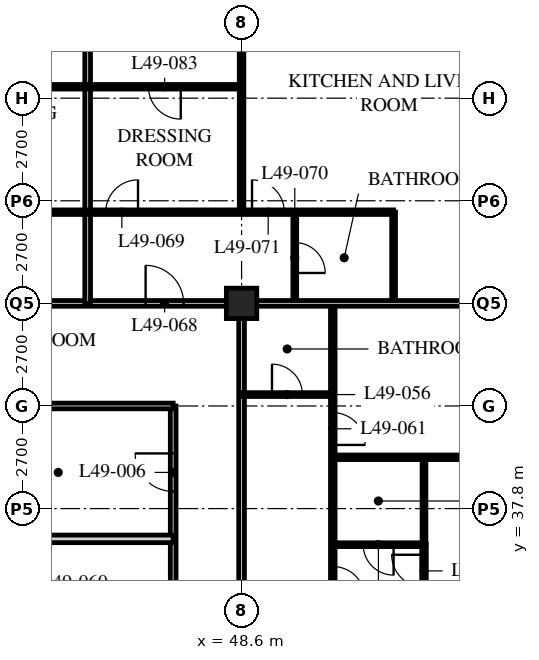
"""IFC4 building model, lengths in metres.
Left out: names, types, materials, properties, quantities, classifications, styles, units other than length and angle.
Written with IfcOpenShell. Run it as: python <this file> out.ifc"""

import sys

from ifc_helpers import new_model, si_unit, direction, frame, frame_2d, origin, origin_2d, place, context, subcontext, project, spatial, rectangle, hollow_rectangle, extrude, element, fill, save


model = new_model("IFC4")
c1 = context("Model", 3, precision=1e-05, world=origin(), true_north=direction((0.0, 1.0)))
c2 = subcontext(c1, "Body", "Model", "MODEL_VIEW")
j1 = project(units=[si_unit("LENGTHUNIT", "METRE"), si_unit("PLANEANGLEUNIT", "RADIAN")], contexts=[c1])
p1 = place(None, origin())
s1 = spatial("IfcSite", under=j1, at=p1, CompositionType="ELEMENT")
p2 = place(p1, origin())
s2 = spatial("IfcBuilding", under=s1, at=p2, CompositionType="ELEMENT")
p3 = place(p2, frame((0.0, 0.0, 192.0)))
s3 = spatial("IfcBuildingStorey", under=s2, at=p3, CompositionType="ELEMENT", Elevation=192.0)
p4 = place(p3, frame((48.6, 43.2, 0.0), z_axis=(0.0, 0.0, 1.0), x_axis=(1.0, 0.0, 0.0)))
e1 = element("IfcColumn", 1, at=p4, inside=s3, PredefinedType="COLUMN", context=c2, shape_type="SweptSolid", body=[
    extrude(hollow_rectangle(XDim=0.8, YDim=0.8, WallThickness=0.08, at=origin_2d()), origin(), (0.0, 0.0, 1.0), 3.6),
])
p5 = place(p3, frame((8.1, 43.2, 0.0), z_axis=(0.0, 0.0, 1.0), x_axis=(1.0, 0.0, 0.0)))
e2 = element("IfcWall", 2, at=p5, inside=s3, PredefinedType="PARTITIONING", context=c2, shape_type="SweptSolid", body=[
    extrude(rectangle(XDim=40.5, YDim=0.15, at=frame_2d((20.25, 0.0))), origin(), (0.0, 0.0, 1.0), 2.778),
])
p6 = place(p5, frame((4.45, 0.0, 0.0)))
e3 = element("IfcOpeningElement", 3, at=p6, cuts=e2, PredefinedType="OPENING", context=c2, shape_type="SweptSolid", body=[
    extrude(rectangle(XDim=1.0, YDim=2.1, at=frame_2d((0.5, 1.05))), frame((0.0, 0.085, 0.0), z_axis=(0.0, -1.0, 0.0), x_axis=(1.0, 0.0, 0.0)), (0.0, 0.0, 1.0), 0.17),
])
p7 = place(p5, frame((20.65, 0.0, 0.0)))
e4 = element("IfcOpeningElement", 4, at=p7, cuts=e2, PredefinedType="OPENING", context=c2, shape_type="SweptSolid", body=[
    extrude(rectangle(XDim=1.0, YDim=2.1, at=frame_2d((0.5, 1.05))), frame((0.0, 0.085, 0.0), z_axis=(0.0, -1.0, 0.0), x_axis=(1.0, 0.0, 0.0)), (0.0, 0.0, 1.0), 0.17),
])
p8 = place(p5, frame((28.75, 0.0, 0.0)))
e5 = element("IfcOpeningElement", 5, at=p8, cuts=e2, PredefinedType="OPENING", context=c2, shape_type="SweptSolid", body=[
    extrude(rectangle(XDim=1.0, YDim=2.1, at=frame_2d((0.5, 1.05))), frame((0.0, 0.085, 0.0), z_axis=(0.0, -1.0, 0.0), x_axis=(1.0, 0.0, 0.0)), (0.0, 0.0, 1.0), 0.17),
])
p9 = place(p5, frame((37.975, 0.0, 0.0)))
e6 = element("IfcOpeningElement", 6, at=p9, cuts=e2, PredefinedType="OPENING", context=c2, shape_type="SweptSolid", body=[
    extrude(rectangle(XDim=1.0, YDim=2.1, at=frame_2d((0.5, 1.05))), frame((0.0, 0.085, 0.0), z_axis=(0.0, -1.0, 0.0), x_axis=(1.0, 0.0, 0.0)), (0.0, 0.0, 1.0), 0.17),
])
p10 = place(p5, frame((1.525, 0.0, 0.0)))
e7 = element("IfcOpeningElement", 7, at=p10, cuts=e2, PredefinedType="OPENING", context=c2, shape_type="SweptSolid", body=[
    extrude(rectangle(XDim=1.0, YDim=2.1, at=frame_2d((0.5, 1.05))), frame((0.0, 0.085, 0.0), z_axis=(0.0, -1.0, 0.0), x_axis=(1.0, 0.0, 0.0)), (0.0, 0.0, 1.0), 0.17),
])
p11 = place(p3, frame((48.6, 18.9, 0.0), z_axis=(0.0, 0.0, 1.0), x_axis=(0.0, 1.0, 0.0)))
e8 = element("IfcWall", 8, at=p11, inside=s3, PredefinedType="PARTITIONING", context=c2, shape_type="SweptSolid", body=[
    extrude(rectangle(XDim=24.3, YDim=0.15, at=frame_2d((12.15, 0.0))), origin(), (0.0, 0.0, 1.0), 2.778),
])
p12 = place(p11, frame((2.35, 0.0, 0.0)))
e9 = element("IfcOpeningElement", 9, at=p12, cuts=e8, PredefinedType="OPENING", context=c2, shape_type="SweptSolid", body=[
    extrude(rectangle(XDim=1.0, YDim=2.1, at=frame_2d((0.5, 1.05))), frame((0.0, 0.085, 0.0), z_axis=(0.0, -1.0, 0.0), x_axis=(1.0, 0.0, 0.0)), (0.0, 0.0, 1.0), 0.17),
])
p13 = place(p11, frame((4.75, 0.0, 0.0)))
e10 = element("IfcOpeningElement", 10, at=p13, cuts=e8, PredefinedType="OPENING", context=c2, shape_type="SweptSolid", body=[
    extrude(rectangle(XDim=1.0, YDim=2.1, at=frame_2d((0.5, 1.05))), frame((0.0, 0.085, 0.0), z_axis=(0.0, -1.0, 0.0), x_axis=(1.0, 0.0, 0.0)), (0.0, 0.0, 1.0), 0.17),
])
p14 = place(p11, frame((9.0, 0.0, 0.0)))
e11 = element("IfcOpeningElement", 11, at=p14, cuts=e8, PredefinedType="OPENING", context=c2, shape_type="SweptSolid", body=[
    extrude(rectangle(XDim=1.0, YDim=2.1, at=frame_2d((0.5, 1.05))), frame((0.0, 0.085, 0.0), z_axis=(0.0, -1.0, 0.0), x_axis=(1.0, 0.0, 0.0)), (0.0, 0.0, 1.0), 0.17),
])
p15 = place(p3, frame((46.8, 20.7, 0.0), z_axis=(0.0, 0.0, 1.0), x_axis=(0.0, 1.0, 0.0)))
e12 = element("IfcWall", 12, at=p15, inside=s3, PredefinedType="PARTITIONING", context=c2, shape_type="SweptSolid", body=[
    extrude(rectangle(XDim=19.8, YDim=0.15, at=frame_2d((9.9, 0.0))), origin(), (0.0, 0.0, 1.0), 3.39),
])
p16 = place(p15, frame((4.052, 0.0, 0.0)))
e13 = element("IfcOpeningElement", 13, at=p16, cuts=e12, PredefinedType="OPENING", context=c2, shape_type="SweptSolid", body=[
    extrude(rectangle(XDim=1.0, YDim=2.1, at=frame_2d((0.5, 1.05))), frame((0.0, 0.085, 0.0), z_axis=(0.0, -1.0, 0.0), x_axis=(1.0, 0.0, 0.0)), (0.0, 0.0, 1.0), 0.17),
])
p17 = place(p15, frame((8.102, 0.0, 0.0)))
e14 = element("IfcOpeningElement", 14, at=p17, cuts=e12, PredefinedType="OPENING", context=c2, shape_type="SweptSolid", body=[
    extrude(rectangle(XDim=1.0, YDim=2.1, at=frame_2d((0.5, 1.05))), frame((0.0, 0.085, 0.0), z_axis=(0.0, -1.0, 0.0), x_axis=(1.0, 0.0, 0.0)), (0.0, 0.0, 1.0), 0.17),
])
p18 = place(p15, frame((13.502, 0.0, 0.0)))
e15 = element("IfcOpeningElement", 15, at=p18, cuts=e12, PredefinedType="OPENING", context=c2, shape_type="SweptSolid", body=[
    extrude(rectangle(XDim=1.0, YDim=2.1, at=frame_2d((0.5, 1.05))), frame((0.0, 0.085, 0.0), z_axis=(0.0, -1.0, 0.0), x_axis=(1.0, 0.0, 0.0)), (0.0, 0.0, 1.0), 0.17),
])
p19 = place(p15, frame((17.552, 0.0, 0.0)))
e16 = element("IfcOpeningElement", 16, at=p19, cuts=e12, PredefinedType="OPENING", context=c2, shape_type="SweptSolid", body=[
    extrude(rectangle(XDim=1.0, YDim=2.1, at=frame_2d((0.5, 1.05))), frame((0.0, 0.085, 0.0), z_axis=(0.0, -1.0, 0.0), x_axis=(1.0, 0.0, 0.0)), (0.0, 0.0, 1.0), 0.17),
])
p20 = place(p3, frame((46.8, 40.5, 0.0), z_axis=(0.0, 0.0, 1.0), x_axis=(-1.0, 0.0, 0.0)))
e17 = element("IfcWall", 17, at=p20, inside=s3, PredefinedType="PARTITIONING", context=c2, shape_type="SweptSolid", body=[
    extrude(rectangle(XDim=6.1, YDim=0.15, at=frame_2d((3.05, 0.0))), origin(), (0.0, 0.0, 1.0), 3.39),
])
p21 = place(p3, frame((46.8, 37.003, 0.0), z_axis=(0.0, 0.0, 1.0), x_axis=(-1.0, 0.0, 0.0)))
e18 = element("IfcWall", 18, at=p21, inside=s3, PredefinedType="SOLIDWALL", context=c2, shape_type="SweptSolid", body=[
    extrude(rectangle(XDim=6.3, YDim=0.2, at=frame_2d((3.15, 0.0))), origin(), (0.0, 0.0, 1.0), 3.39),
])
p22 = place(p3, frame((51.0, 27.0, 0.0), z_axis=(0.0, 0.0, 1.0), x_axis=(0.0, 1.0, 0.0)))
e19 = element("IfcWall", 19, at=p22, inside=s3, PredefinedType="PARTITIONING", context=c2, shape_type="SweptSolid", body=[
    extrude(rectangle(XDim=16.2, YDim=0.12, at=frame_2d((8.1, 0.0))), origin(), (0.0, 0.0, 1.0), 3.39),
])
p23 = place(p22, frame((0.975, 0.0, 0.0)))
e20 = element("IfcOpeningElement", 20, at=p23, cuts=e19, PredefinedType="OPENING", context=c2, shape_type="SweptSolid", body=[
    extrude(rectangle(XDim=0.85, YDim=2.1, at=frame_2d((0.425, 1.05))), frame((0.0, 0.07, 0.0), z_axis=(0.0, -1.0, 0.0), x_axis=(1.0, 0.0, 0.0)), (0.0, 0.0, 1.0), 0.14),
])
p24 = place(p22, frame((8.425, 0.0, 0.0)))
e21 = element("IfcOpeningElement", 21, at=p24, cuts=e19, PredefinedType="OPENING", context=c2, shape_type="SweptSolid", body=[
    extrude(rectangle(XDim=0.85, YDim=2.1, at=frame_2d((0.425, 1.05))), frame((0.0, 0.07, 0.0), z_axis=(0.0, -1.0, 0.0), x_axis=(1.0, 0.0, 0.0)), (0.0, 0.0, 1.0), 0.14),
])
p25 = place(p22, frame((12.475, 0.0, 0.0)))
e22 = element("IfcOpeningElement", 22, at=p25, cuts=e19, PredefinedType="OPENING", context=c2, shape_type="SweptSolid", body=[
    extrude(rectangle(XDim=0.85, YDim=2.1, at=frame_2d((0.425, 1.05))), frame((0.0, 0.07, 0.0), z_axis=(0.0, -1.0, 0.0), x_axis=(1.0, 0.0, 0.0)), (0.0, 0.0, 1.0), 0.14),
])
p26 = place(p3, frame((48.6, 40.8, 0.0), z_axis=(0.0, 0.0, 1.0), x_axis=(1.0, 0.0, 0.0)))
e23 = element("IfcWall", 23, at=p26, inside=s3, PredefinedType="PARTITIONING", context=c2, shape_type="SweptSolid", body=[
    extrude(rectangle(XDim=2.4, YDim=0.1, at=frame_2d((1.2, 0.0))), origin(), (0.0, 0.0, 1.0), 3.39),
])
p27 = place(p26, frame((0.8, 0.0, 0.0)))
e24 = element("IfcOpeningElement", 24, at=p27, cuts=e23, PredefinedType="OPENING", context=c2, shape_type="SweptSolid", body=[
    extrude(rectangle(XDim=0.8, YDim=2.1, at=frame_2d((0.4, 1.05))), frame((0.0, 0.06, 0.0), z_axis=(0.0, -1.0, 0.0), x_axis=(1.0, 0.0, 0.0)), (0.0, 0.0, 1.0), 0.12),
])
p28 = place(p3, frame((51.0, 36.85, 0.0), z_axis=(0.0, 0.0, 1.0), x_axis=(1.0, 0.0, 0.0)))
e25 = element("IfcWall", 25, at=p28, inside=s3, PredefinedType="PARTITIONING", context=c2, shape_type="SweptSolid", body=[
    extrude(rectangle(XDim=2.4, YDim=0.1, at=frame_2d((1.2, 0.0))), origin(), (0.0, 0.0, 1.0), 3.39),
])
p29 = place(p28, frame((0.8, 0.0, 0.0)))
e26 = element("IfcOpeningElement", 26, at=p29, cuts=e25, PredefinedType="OPENING", context=c2, shape_type="SweptSolid", body=[
    extrude(rectangle(XDim=0.8, YDim=2.1, at=frame_2d((0.4, 1.05))), frame((0.0, 0.06, 0.0), z_axis=(0.0, -1.0, 0.0), x_axis=(1.0, 0.0, 0.0)), (0.0, 0.0, 1.0), 0.12),
])
p30 = place(p3, frame((53.4, 36.85, 0.0), z_axis=(0.0, 0.0, 1.0), x_axis=(0.0, 1.0, 0.0)))
e27 = element("IfcWall", 27, at=p30, inside=s3, PredefinedType="PARTITIONING", context=c2, shape_type="SweptSolid", body=[
    extrude(rectangle(XDim=2.3, YDim=0.1, at=frame_2d((1.15, 0.0))), origin(), (0.0, 0.0, 1.0), 3.39),
])
p31 = place(p3, frame((51.0, 39.15, 0.0), z_axis=(0.0, 0.0, 1.0), x_axis=(1.0, 0.0, 0.0)))
e28 = element("IfcWall", 28, at=p31, inside=s3, PredefinedType="PARTITIONING", context=c2, shape_type="SweptSolid", body=[
    extrude(rectangle(XDim=5.4, YDim=0.12, at=frame_2d((2.7, 0.0))), origin(), (0.0, 0.0, 1.0), 3.39),
])
p32 = place(p3, frame((50.0, 43.2, 0.0), z_axis=(0.0, 0.0, 1.0), x_axis=(0.0, 1.0, 0.0)))
e29 = element("IfcWall", 29, at=p32, inside=s3, PredefinedType="PARTITIONING", context=c2, shape_type="SweptSolid", body=[
    extrude(rectangle(XDim=2.4, YDim=0.1, at=frame_2d((1.2, 0.0))), origin(), (0.0, 0.0, 1.0), 3.39),
])
p33 = place(p32, frame((0.8, 0.0, 0.0)))
e30 = element("IfcOpeningElement", 30, at=p33, cuts=e29, PredefinedType="OPENING", context=c2, shape_type="SweptSolid", body=[
    extrude(rectangle(XDim=0.8, YDim=2.1, at=frame_2d((0.4, 1.05))), frame((0.0, 0.06, 0.0), z_axis=(0.0, -1.0, 0.0), x_axis=(1.0, 0.0, 0.0)), (0.0, 0.0, 1.0), 0.12),
])
p34 = place(p3, frame((52.6, 43.2, 0.0), z_axis=(0.0, 0.0, 1.0), x_axis=(0.0, 1.0, 0.0)))
e31 = element("IfcWall", 31, at=p34, inside=s3, PredefinedType="PARTITIONING", context=c2, shape_type="SweptSolid", body=[
    extrude(rectangle(XDim=2.4, YDim=0.1, at=frame_2d((1.2, 0.0))), origin(), (0.0, 0.0, 1.0), 3.39),
])
p35 = place(p3, frame((48.6, 45.6, 0.0), z_axis=(0.0, 0.0, 1.0), x_axis=(0.0, 1.0, 0.0)))
e32 = element("IfcWall", 32, at=p35, inside=s3, PredefinedType="PARTITIONING", context=c2, shape_type="SweptSolid", body=[
    extrude(rectangle(XDim=9.45, YDim=0.12, at=frame_2d((4.725, 0.0))), origin(), (0.0, 0.0, 1.0), 2.778),
])
p36 = place(p3, frame((48.6, 43.2, 0.0), z_axis=(0.0, 0.0, 1.0), x_axis=(1.0, 0.0, 0.0)))
e33 = element("IfcWall", 33, at=p36, inside=s3, PredefinedType="PARTITIONING", context=c2, shape_type="SweptSolid", body=[
    extrude(rectangle(XDim=7.8, YDim=0.15, at=frame_2d((3.9, 0.0))), origin(), (0.0, 0.0, 1.0), 2.778),
])
p37 = place(p3, frame((44.55, 43.2, 0.0), z_axis=(0.0, 0.0, 1.0), x_axis=(0.0, 1.0, 0.0)))
e34 = element("IfcWall", 34, at=p37, inside=s3, PredefinedType="PARTITIONING", context=c2, shape_type="SweptSolid", body=[
    extrude(rectangle(XDim=15.9, YDim=0.15, at=frame_2d((7.95, 0.0))), origin(), (0.0, 0.0, 1.0), 3.39),
])
p38 = place(p3, frame((4.1, 45.6, 0.0), z_axis=(0.0, 0.0, 1.0), x_axis=(1.0, 0.0, 0.0)))
e35 = element("IfcWall", 35, at=p38, inside=s3, PredefinedType="PARTITIONING", context=c2, shape_type="SweptSolid", body=[
    extrude(rectangle(XDim=48.5, YDim=0.12, at=frame_2d((24.25, 0.0))), origin(), (0.0, 0.0, 1.0), 3.39),
])
p39 = place(p38, frame((9.025, 0.0, 0.0)))
e36 = element("IfcOpeningElement", 36, at=p39, cuts=e35, PredefinedType="OPENING", context=c2, shape_type="SweptSolid", body=[
    extrude(rectangle(XDim=0.85, YDim=2.1, at=frame_2d((0.425, 1.05))), frame((0.0, 0.07, 0.0), z_axis=(0.0, -1.0, 0.0), x_axis=(1.0, 0.0, 0.0)), (0.0, 0.0, 1.0), 0.14),
])
p40 = place(p38, frame((16.475, 0.0, 0.0)))
e37 = element("IfcOpeningElement", 37, at=p40, cuts=e35, PredefinedType="OPENING", context=c2, shape_type="SweptSolid", body=[
    extrude(rectangle(XDim=0.85, YDim=2.1, at=frame_2d((0.425, 1.05))), frame((0.0, 0.07, 0.0), z_axis=(0.0, -1.0, 0.0), x_axis=(1.0, 0.0, 0.0)), (0.0, 0.0, 1.0), 0.14),
])
p41 = place(p38, frame((20.525, 0.0, 0.0)))
e38 = element("IfcOpeningElement", 38, at=p41, cuts=e35, PredefinedType="OPENING", context=c2, shape_type="SweptSolid", body=[
    extrude(rectangle(XDim=0.85, YDim=2.1, at=frame_2d((0.425, 1.05))), frame((0.0, 0.07, 0.0), z_axis=(0.0, -1.0, 0.0), x_axis=(1.0, 0.0, 0.0)), (0.0, 0.0, 1.0), 0.14),
])
p42 = place(p38, frame((25.225, 0.0, 0.0)))
e39 = element("IfcOpeningElement", 39, at=p42, cuts=e35, PredefinedType="OPENING", context=c2, shape_type="SweptSolid", body=[
    extrude(rectangle(XDim=0.85, YDim=2.1, at=frame_2d((0.425, 1.05))), frame((0.0, 0.07, 0.0), z_axis=(0.0, -1.0, 0.0), x_axis=(1.0, 0.0, 0.0)), (0.0, 0.0, 1.0), 0.14),
])
p43 = place(p38, frame((28.625, 0.0, 0.0)))
e40 = element("IfcOpeningElement", 40, at=p43, cuts=e35, PredefinedType="OPENING", context=c2, shape_type="SweptSolid", body=[
    extrude(rectangle(XDim=0.85, YDim=2.1, at=frame_2d((0.425, 1.05))), frame((0.0, 0.07, 0.0), z_axis=(0.0, -1.0, 0.0), x_axis=(1.0, 0.0, 0.0)), (0.0, 0.0, 1.0), 0.14),
])
p44 = place(p38, frame((33.325, 0.0, 0.0)))
e41 = element("IfcOpeningElement", 41, at=p44, cuts=e35, PredefinedType="OPENING", context=c2, shape_type="SweptSolid", body=[
    extrude(rectangle(XDim=0.85, YDim=2.1, at=frame_2d((0.425, 1.05))), frame((0.0, 0.07, 0.0), z_axis=(0.0, -1.0, 0.0), x_axis=(1.0, 0.0, 0.0)), (0.0, 0.0, 1.0), 0.14),
])
p45 = place(p38, frame((36.725, 0.0, 0.0)))
e42 = element("IfcOpeningElement", 42, at=p45, cuts=e35, PredefinedType="OPENING", context=c2, shape_type="SweptSolid", body=[
    extrude(rectangle(XDim=0.85, YDim=2.1, at=frame_2d((0.425, 1.05))), frame((0.0, 0.07, 0.0), z_axis=(0.0, -1.0, 0.0), x_axis=(1.0, 0.0, 0.0)), (0.0, 0.0, 1.0), 0.14),
])
p46 = place(p38, frame((40.925, 0.0, 0.0)))
e43 = element("IfcOpeningElement", 43, at=p46, cuts=e35, PredefinedType="OPENING", context=c2, shape_type="SweptSolid", body=[
    extrude(rectangle(XDim=0.85, YDim=2.1, at=frame_2d((0.425, 1.05))), frame((0.0, 0.07, 0.0), z_axis=(0.0, -1.0, 0.0), x_axis=(1.0, 0.0, 0.0)), (0.0, 0.0, 1.0), 0.14),
])
p47 = place(p38, frame((44.775, 0.0, 0.0)))
e44 = element("IfcOpeningElement", 44, at=p47, cuts=e35, PredefinedType="OPENING", context=c2, shape_type="SweptSolid", body=[
    extrude(rectangle(XDim=0.85, YDim=2.1, at=frame_2d((0.425, 1.05))), frame((0.0, 0.07, 0.0), z_axis=(0.0, -1.0, 0.0), x_axis=(1.0, 0.0, 0.0)), (0.0, 0.0, 1.0), 0.14),
])
p48 = place(p38, frame((6.725, 0.0, 0.0)))
e45 = element("IfcOpeningElement", 45, at=p48, cuts=e35, PredefinedType="OPENING", context=c2, shape_type="SweptSolid", body=[
    extrude(rectangle(XDim=0.85, YDim=2.1, at=frame_2d((0.425, 1.05))), frame((0.0, 0.07, 0.0), z_axis=(0.0, -1.0, 0.0), x_axis=(1.0, 0.0, 0.0)), (0.0, 0.0, 1.0), 0.14),
])
p49 = place(p38, frame((2.875, 0.0, 0.0)))
e46 = element("IfcOpeningElement", 46, at=p49, cuts=e35, PredefinedType="OPENING", context=c2, shape_type="SweptSolid", body=[
    extrude(rectangle(XDim=0.85, YDim=2.1, at=frame_2d((0.425, 1.05))), frame((0.0, 0.07, 0.0), z_axis=(0.0, -1.0, 0.0), x_axis=(1.0, 0.0, 0.0)), (0.0, 0.0, 1.0), 0.14),
])
p50 = place(p3, frame((53.4, 36.86, 0.0), z_axis=(0.0, 0.0, 1.0), x_axis=(0.0, -1.0, 0.0)))
e47 = element("IfcWall", 47, at=p50, inside=s3, PredefinedType="PARTITIONING", context=c2, shape_type="SweptSolid", body=[
    extrude(rectangle(XDim=1.76, YDim=0.12, at=frame_2d((0.88, 0.0))), origin(), (0.0, 0.0, 1.0), 3.39),
])
p51 = place(p50, frame((0.275, 0.0, 0.0)))
e48 = element("IfcOpeningElement", 48, at=p51, cuts=e47, PredefinedType="OPENING", context=c2, shape_type="SweptSolid", body=[
    extrude(rectangle(XDim=0.85, YDim=2.1, at=frame_2d((0.425, 1.05))), frame((0.0, 0.07, 0.0), z_axis=(0.0, -1.0, 0.0), x_axis=(1.0, 0.0, 0.0)), (0.0, 0.0, 1.0), 0.14),
])
p52 = place(p3, frame((40.5, 48.9, 0.0), z_axis=(0.0, 0.0, 1.0), x_axis=(1.0, 0.0, 0.0)))
e49 = element("IfcWall", 49, at=p52, inside=s3, PredefinedType="PARTITIONING", context=c2, shape_type="SweptSolid", body=[
    extrude(rectangle(XDim=8.1, YDim=0.12, at=frame_2d((4.05, 0.0))), origin(), (0.0, 0.0, 1.0), 3.39),
])
p53 = place(p52, frame((1.6, 0.0, 0.0)))
e50 = element("IfcOpeningElement", 50, at=p53, cuts=e49, PredefinedType="OPENING", context=c2, shape_type="SweptSolid", body=[
    extrude(rectangle(XDim=0.85, YDim=2.1, at=frame_2d((0.425, 1.05))), frame((0.0, 0.07, 0.0), z_axis=(0.0, -1.0, 0.0), x_axis=(1.0, 0.0, 0.0)), (0.0, 0.0, 1.0), 0.14),
])
p54 = place(p52, frame((5.65, 0.0, 0.0)))
e51 = element("IfcOpeningElement", 51, at=p54, cuts=e49, PredefinedType="OPENING", context=c2, shape_type="SweptSolid", body=[
    extrude(rectangle(XDim=0.85, YDim=2.1, at=frame_2d((0.425, 1.05))), frame((0.0, 0.07, 0.0), z_axis=(0.0, -1.0, 0.0), x_axis=(1.0, 0.0, 0.0)), (0.0, 0.0, 1.0), 0.14),
])
p55 = place(p19, origin())
e52 = element("IfcDoor", 52, at=p55, inside=s3, OperationType="SINGLE_SWING_RIGHT", PredefinedType="DOOR", context=c2, shape_type="SweptSolid", body=[
    extrude(rectangle(XDim=1.0, YDim=2.1, at=frame_2d((0.5, 1.05))), frame((0.0, 0.025, 0.0), z_axis=(0.0, -1.0, 0.0), x_axis=(1.0, 0.0, 0.0)), (0.0, 0.0, 1.0), 0.05),
])
fill(e16, e52)
p56 = place(p27, origin())
e53 = element("IfcDoor", 53, at=p56, inside=s3, OperationType="SINGLE_SWING_LEFT", PredefinedType="DOOR", context=c2, shape_type="SweptSolid", body=[
    extrude(rectangle(XDim=0.8, YDim=2.1, at=frame_2d((0.4, 1.05))), frame((0.0, 0.025, 0.0), z_axis=(0.0, -1.0, 0.0), x_axis=(1.0, 0.0, 0.0)), (0.0, 0.0, 1.0), 0.05),
])
fill(e24, e53)
p57 = place(p29, origin())
e54 = element("IfcDoor", 54, at=p57, inside=s3, OperationType="SINGLE_SWING_LEFT", PredefinedType="DOOR", context=c2, shape_type="SweptSolid", body=[
    extrude(rectangle(XDim=0.8, YDim=2.1, at=frame_2d((0.4, 1.05))), frame((0.0, 0.025, 0.0), z_axis=(0.0, -1.0, 0.0), x_axis=(1.0, 0.0, 0.0)), (0.0, 0.0, 1.0), 0.05),
])
fill(e26, e54)
p58 = place(p24, origin())
e55 = element("IfcDoor", 55, at=p58, inside=s3, OperationType="SINGLE_SWING_RIGHT", PredefinedType="DOOR", context=c2, shape_type="SweptSolid", body=[
    extrude(rectangle(XDim=0.85, YDim=2.1, at=frame_2d((0.425, 1.05))), frame((0.0, 0.025, 0.0), z_axis=(0.0, -1.0, 0.0), x_axis=(1.0, 0.0, 0.0)), (0.0, 0.0, 1.0), 0.05),
])
fill(e21, e55)
p59 = place(p25, origin())
e56 = element("IfcDoor", 56, at=p59, inside=s3, OperationType="SINGLE_SWING_RIGHT", PredefinedType="DOOR", context=c2, shape_type="SweptSolid", body=[
    extrude(rectangle(XDim=0.85, YDim=2.1, at=frame_2d((0.425, 1.05))), frame((0.0, 0.025, 0.0), z_axis=(0.0, -1.0, 0.0), x_axis=(1.0, 0.0, 0.0)), (0.0, 0.0, 1.0), 0.05),
])
fill(e22, e56)
p60 = place(p9, origin())
e57 = element("IfcDoor", 57, at=p60, inside=s3, OperationType="SINGLE_SWING_LEFT", PredefinedType="DOOR", context=c2, shape_type="SweptSolid", body=[
    extrude(rectangle(XDim=1.0, YDim=2.1, at=frame_2d((0.5, 1.05))), frame((0.0, 0.025, 0.0), z_axis=(0.0, -1.0, 0.0), x_axis=(1.0, 0.0, 0.0)), (0.0, 0.0, 1.0), 0.05),
])
fill(e6, e57)
p61 = place(p46, origin())
e58 = element("IfcDoor", 58, at=p61, inside=s3, OperationType="SINGLE_SWING_RIGHT", PredefinedType="DOOR", context=c2, shape_type="SweptSolid", body=[
    extrude(rectangle(XDim=0.85, YDim=2.1, at=frame_2d((0.425, 1.05))), frame((0.0, 0.025, 0.0), z_axis=(0.0, -1.0, 0.0), x_axis=(1.0, 0.0, 0.0)), (0.0, 0.0, 1.0), 0.05),
])
fill(e43, e58)
p62 = place(p33, origin())
e59 = element("IfcDoor", 59, at=p62, inside=s3, OperationType="SINGLE_SWING_RIGHT", PredefinedType="DOOR", context=c2, shape_type="SweptSolid", body=[
    extrude(rectangle(XDim=0.8, YDim=2.1, at=frame_2d((0.4, 1.05))), frame((0.0, 0.025, 0.0), z_axis=(0.0, -1.0, 0.0), x_axis=(1.0, 0.0, 0.0)), (0.0, 0.0, 1.0), 0.05),
])
fill(e30, e59)
p63 = place(p47, origin())
e60 = element("IfcDoor", 60, at=p63, inside=s3, OperationType="SINGLE_SWING_LEFT", PredefinedType="DOOR", context=c2, shape_type="SweptSolid", body=[
    extrude(rectangle(XDim=0.85, YDim=2.1, at=frame_2d((0.425, 1.05))), frame((0.0, 0.025, 0.0), z_axis=(0.0, -1.0, 0.0), x_axis=(1.0, 0.0, 0.0)), (0.0, 0.0, 1.0), 0.05),
])
fill(e44, e60)
p64 = place(p51, origin())
e61 = element("IfcDoor", 61, at=p64, inside=s3, OperationType="SINGLE_SWING_RIGHT", PredefinedType="DOOR", context=c2, shape_type="SweptSolid", body=[
    extrude(rectangle(XDim=0.85, YDim=2.1, at=frame_2d((0.425, 1.05))), frame((0.0, 0.025, 0.0), z_axis=(0.0, -1.0, 0.0), x_axis=(1.0, 0.0, 0.0)), (0.0, 0.0, 1.0), 0.05),
])
fill(e48, e61)
p65 = place(p54, origin())
e62 = element("IfcDoor", 62, at=p65, inside=s3, OperationType="SINGLE_SWING_LEFT", PredefinedType="DOOR", context=c2, shape_type="SweptSolid", body=[
    extrude(rectangle(XDim=0.85, YDim=2.1, at=frame_2d((0.425, 1.05))), frame((0.0, 0.025, 0.0), z_axis=(0.0, -1.0, 0.0), x_axis=(1.0, 0.0, 0.0)), (0.0, 0.0, 1.0), 0.05),
])
fill(e51, e62)
save(model, sys.argv[1])
